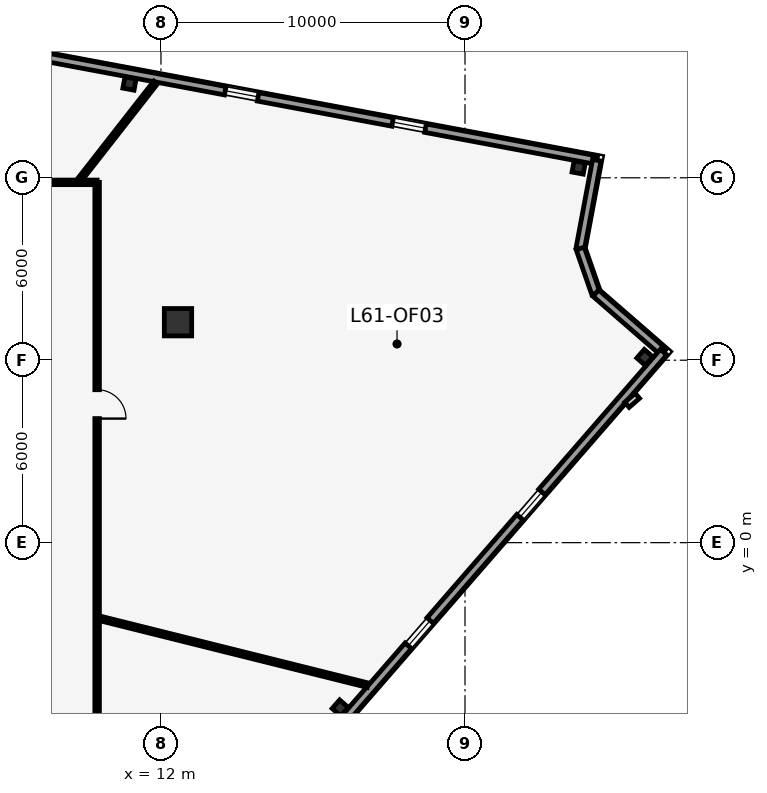
"""IFC4 building model, lengths in metres.
Left out: names, types, materials, properties, quantities, classifications, styles, units other than length and angle.
Written with IfcOpenShell. Run it as: python <this file> out.ifc"""

import sys

from ifc_helpers import new_model, si_unit, direction, frame, frame_2d, origin, origin_2d, place, context, subcontext, project, spatial, rectangle, i_section, extrude, element, fill, save


model = new_model("IFC4")
c1 = context("Model", 3, precision=1e-05, world=origin(), true_north=direction((0.0, 1.0)))
c2 = subcontext(c1, "Body", "Model", "MODEL_VIEW")
j1 = project(units=[si_unit("LENGTHUNIT", "METRE"), si_unit("PLANEANGLEUNIT", "RADIAN")], contexts=[c1])
p1 = place(None, origin())
s1 = spatial("IfcSite", under=j1, at=p1, CompositionType="ELEMENT")
p2 = place(p1, origin())
s2 = spatial("IfcBuilding", under=s1, at=p2, CompositionType="ELEMENT")
p3 = place(p2, frame((0.0, 0.0, 260.9)))
s3 = spatial("IfcBuildingStorey", under=s2, at=p3, CompositionType="ELEMENT", Elevation=260.9)
p4 = place(p3, frame((12.56, 7.25, 0.0), z_axis=(0.0, 0.0, 1.0), x_axis=(1.0, 0.0, 0.0)))
e1 = element("IfcColumn", 1, at=p4, inside=s3, PredefinedType="COLUMN", context=c2, shape_type="SweptSolid", body=[
    extrude(rectangle(XDim=0.9, YDim=0.9, at=origin_2d()), origin(), (0.0, 0.0, 1.0), 4.6),
])
for number, where, z_axis, x_axis in (
    (2, (17.894, -5.436, 0.0), (0.0, 0.0, 1.0), (0.656, 0.755, 0.0)),
    (3, (27.915, 6.091, 0.0), (0.0, 0.0, 1.0), (0.656, 0.755, 0.0)),
    (4, (25.738, 12.338, 0.0), (0.0, 0.0, 1.0), (-0.983, 0.184, 0.0)),
    (5, (10.965, 15.099, 0.0), (0.0, 0.0, 1.0), (-0.983, 0.184, 0.0)),
):
    element("IfcColumn", number, at=place(p3, frame(where, z_axis=z_axis, x_axis=x_axis)), inside=s3, PredefinedType="COLUMN", context=c2, shape_type="SweptSolid", body=[
        extrude(i_section(OverallWidth=0.373, OverallDepth=0.373, WebThickness=0.016, FlangeThickness=0.026, at=origin_2d()), origin(), (0.0, 0.0, 1.0), 4.6),
    ])
p5 = place(p3, frame((-19.042, 21.066, 0.0), z_axis=(0.0, 0.0, 1.0), x_axis=(0.982948140881, -0.183882985453, 0.0)))
e6 = element("IfcWall", 6, at=p5, inside=s3, PredefinedType="STANDARD", context=c2, shape_type="SweptSolid", body=[
    extrude(rectangle(XDim=46.163, YDim=0.28, at=frame_2d((23.081, 0.0))), origin(), (0.0, 0.0, 1.0), 4.35),
])
p6 = place(p5, frame((5.731, 0.0, 0.85)))
e7 = element("IfcOpeningElement", 7, at=p6, cuts=e6, PredefinedType="OPENING", context=c2, shape_type="SweptSolid", body=[
    extrude(rectangle(XDim=1.1, YDim=2.15, at=frame_2d((0.55, 1.075))), frame((0.0, 0.15, 0.0), z_axis=(0.0, -1.0, 0.0), x_axis=(1.0, 0.0, 0.0)), (0.0, 0.0, 1.0), 0.3),
])
p7 = place(p5, frame((33.731, 0.0, 0.85)))
e8 = element("IfcOpeningElement", 8, at=p7, cuts=e6, PredefinedType="OPENING", context=c2, shape_type="SweptSolid", body=[
    extrude(rectangle(XDim=1.1, YDim=2.15, at=frame_2d((0.55, 1.075))), frame((0.0, 0.15, 0.0), z_axis=(0.0, -1.0, 0.0), x_axis=(1.0, 0.0, 0.0)), (0.0, 0.0, 1.0), 0.3),
])
p8 = place(p5, frame((39.331, 0.0, 0.85)))
e9 = element("IfcOpeningElement", 9, at=p8, cuts=e6, PredefinedType="OPENING", context=c2, shape_type="SweptSolid", body=[
    extrude(rectangle(XDim=1.1, YDim=2.15, at=frame_2d((0.55, 1.075))), frame((0.0, 0.15, 0.0), z_axis=(0.0, -1.0, 0.0), x_axis=(1.0, 0.0, 0.0)), (0.0, 0.0, 1.0), 0.3),
])
p9 = place(p3, frame((26.334, 12.578, 0.0), z_axis=(0.0, 0.0, 1.0), x_axis=(-0.183929325972, -0.982939470694, 0.0)))
e10 = element("IfcWall", 10, at=p9, inside=s3, PredefinedType="STANDARD", context=c2, shape_type="SweptSolid", body=[
    extrude(rectangle(XDim=2.955, YDim=0.28, at=frame_2d((1.477, 0.0))), origin(), (0.0, 0.0, 1.0), 4.35),
])
p10 = place(p3, frame((25.791, 9.674, 0.0), z_axis=(0.0, 0.0, 1.0), x_axis=(0.328922695325, -0.944356850189, 0.0)))
e11 = element("IfcWall", 11, at=p10, inside=s3, PredefinedType="STANDARD", context=c2, shape_type="SweptSolid", body=[
    extrude(rectangle(XDim=1.554, YDim=0.28, at=frame_2d((0.777, 0.0))), origin(), (0.0, 0.0, 1.0), 4.35),
])
p11 = place(p3, frame((26.302, 8.206, 0.0), z_axis=(0.0, 0.0, 1.0), x_axis=(0.754717590568, -0.656049814028, 0.0)))
e12 = element("IfcWall", 12, at=p11, inside=s3, PredefinedType="STANDARD", context=c2, shape_type="SweptSolid", body=[
    extrude(rectangle(XDim=2.954, YDim=0.28, at=frame_2d((1.477, 0.0))), origin(), (0.0, 0.0, 1.0), 4.35),
])
p12 = place(p3, frame((28.531, 6.268, 0.0), z_axis=(0.0, 0.0, 1.0), x_axis=(-0.656055748756, -0.754712431674, 0.0)))
e13 = element("IfcWall", 13, at=p12, inside=s3, PredefinedType="STANDARD", context=c2, shape_type="SweptSolid", body=[
    extrude(rectangle(XDim=46.897, YDim=0.28, at=frame_2d((23.448, 0.0))), origin(), (0.0, 0.0, 1.0), 4.35),
])
p13 = place(p12, frame((6.099, 0.0, 0.85)))
e14 = element("IfcOpeningElement", 14, at=p13, cuts=e13, PredefinedType="OPENING", context=c2, shape_type="SweptSolid", body=[
    extrude(rectangle(XDim=1.1, YDim=2.15, at=frame_2d((0.55, 1.075))), frame((0.0, 0.15, 0.0), z_axis=(0.0, -1.0, 0.0), x_axis=(1.0, 0.0, 0.0)), (0.0, 0.0, 1.0), 0.3),
])
p14 = place(p12, frame((11.698, 0.0, 0.85)))
e15 = element("IfcOpeningElement", 15, at=p14, cuts=e13, PredefinedType="OPENING", context=c2, shape_type="SweptSolid", body=[
    extrude(rectangle(XDim=1.1, YDim=2.15, at=frame_2d((0.55, 1.075))), frame((0.0, 0.15, 0.0), z_axis=(0.0, -1.0, 0.0), x_axis=(1.0, 0.0, 0.0)), (0.0, 0.0, 1.0), 0.3),
])
p15 = place(p12, frame((39.698, 0.0, 0.85)))
e16 = element("IfcOpeningElement", 16, at=p15, cuts=e13, PredefinedType="OPENING", context=c2, shape_type="SweptSolid", body=[
    extrude(rectangle(XDim=1.1, YDim=2.15, at=frame_2d((0.55, 1.075))), frame((0.0, 0.15, 0.0), z_axis=(0.0, -1.0, 0.0), x_axis=(1.0, 0.0, 0.0)), (0.0, 0.0, 1.0), 0.3),
])
p16 = place(p3, frame((-2.22, 11.85, 0.0), z_axis=(0.0, 0.0, 1.0), x_axis=(1.0, 0.0, 0.0)))
e17 = element("IfcWall", 17, at=p16, inside=s3, PredefinedType="PARTITIONING", context=c2, shape_type="SweptSolid", body=[
    extrude(rectangle(XDim=12.12, YDim=0.15, at=frame_2d((6.06, 0.0))), origin(), (0.0, 0.0, 1.0), 4.35),
])
p17 = place(p16, frame((5.432, 0.0, 0.0)))
e18 = element("IfcOpeningElement", 18, at=p17, cuts=e17, PredefinedType="OPENING", context=c2, shape_type="SweptSolid", body=[
    extrude(rectangle(XDim=0.95, YDim=2.15, at=frame_2d((0.475, 1.075))), frame((0.0, 0.085, 0.0), z_axis=(0.0, -1.0, 0.0), x_axis=(1.0, 0.0, 0.0)), (0.0, 0.0, 1.0), 0.17),
])
p18 = place(p3, frame((9.9, 11.85, 0.0), z_axis=(0.0, 0.0, 1.0), x_axis=(0.0, -1.0, 0.0)))
e19 = element("IfcWall", 19, at=p18, inside=s3, PredefinedType="PARTITIONING", context=c2, shape_type="SweptSolid", body=[
    extrude(rectangle(XDim=22.634, YDim=0.15, at=frame_2d((11.317, 0.0))), origin(), (0.0, 0.0, 1.0), 4.35),
])
p19 = place(p18, frame((17.885, 0.0, 0.0)))
e20 = element("IfcOpeningElement", 20, at=p19, cuts=e19, PredefinedType="OPENING", context=c2, shape_type="SweptSolid", body=[
    extrude(rectangle(XDim=0.95, YDim=2.15, at=frame_2d((0.475, 1.075))), frame((0.0, 0.085, 0.0), z_axis=(0.0, -1.0, 0.0), x_axis=(1.0, 0.0, 0.0)), (0.0, 0.0, 1.0), 0.17),
])
p20 = place(p18, frame((6.82, 0.0, 0.0)))
e21 = element("IfcOpeningElement", 21, at=p20, cuts=e19, PredefinedType="OPENING", context=c2, shape_type="SweptSolid", body=[
    extrude(rectangle(XDim=0.95, YDim=2.15, at=frame_2d((0.475, 1.075))), frame((0.0, 0.085, 0.0), z_axis=(0.0, -1.0, 0.0), x_axis=(1.0, 0.0, 0.0)), (0.0, 0.0, 1.0), 0.17),
])
p21 = place(p3, frame((9.34, 11.955, 0.0), z_axis=(0.0, 0.0, 1.0), x_axis=(0.615673396763, 0.788001439414, 0.0)))
e22 = element("IfcWall", 22, at=p21, inside=s3, PredefinedType="PARTITIONING", context=c2, shape_type="SweptSolid", body=[
    extrude(rectangle(XDim=4.035, YDim=0.15, at=frame_2d((2.018, 0.0))), origin(), (0.0, 0.0, 1.0), 4.35),
])
p22 = place(p3, frame((10.005, -2.494, 0.0), z_axis=(0.0, 0.0, 1.0), x_axis=(0.970294360483, -0.24192737343, 0.0)))
e23 = element("IfcWall", 23, at=p22, inside=s3, PredefinedType="PARTITIONING", context=c2, shape_type="SweptSolid", body=[
    extrude(rectangle(XDim=9.067, YDim=0.15, at=frame_2d((4.534, 0.0))), origin(), (0.0, 0.0, 1.0), 4.35),
])
p23 = place(p7, origin())
e24 = element("IfcWindow", 24, at=p23, inside=s3, PartitioningType="SINGLE_PANEL", PredefinedType="WINDOW", context=c2, shape_type="SweptSolid", body=[
    extrude(rectangle(XDim=1.1, YDim=2.15, at=frame_2d((0.55, 1.075))), frame((0.0, 0.03, 0.0), z_axis=(0.0, -1.0, 0.0), x_axis=(1.0, 0.0, 0.0)), (0.0, 0.0, 1.0), 0.06),
])
fill(e8, e24)
p24 = place(p8, origin())
e25 = element("IfcWindow", 25, at=p24, inside=s3, PartitioningType="SINGLE_PANEL", PredefinedType="WINDOW", context=c2, shape_type="SweptSolid", body=[
    extrude(rectangle(XDim=1.1, YDim=2.15, at=frame_2d((0.55, 1.075))), frame((0.0, 0.03, 0.0), z_axis=(0.0, -1.0, 0.0), x_axis=(1.0, 0.0, 0.0)), (0.0, 0.0, 1.0), 0.06),
])
fill(e9, e25)
p25 = place(p13, origin())
e26 = element("IfcWindow", 26, at=p25, inside=s3, PartitioningType="SINGLE_PANEL", PredefinedType="WINDOW", context=c2, shape_type="SweptSolid", body=[
    extrude(rectangle(XDim=1.1, YDim=2.15, at=frame_2d((0.55, 1.075))), frame((0.0, 0.03, 0.0), z_axis=(0.0, -1.0, 0.0), x_axis=(1.0, 0.0, 0.0)), (0.0, 0.0, 1.0), 0.06),
])
fill(e14, e26)
p26 = place(p14, origin())
e27 = element("IfcWindow", 27, at=p26, inside=s3, PartitioningType="SINGLE_PANEL", PredefinedType="WINDOW", context=c2, shape_type="SweptSolid", body=[
    extrude(rectangle(XDim=1.1, YDim=2.15, at=frame_2d((0.55, 1.075))), frame((0.0, 0.03, 0.0), z_axis=(0.0, -1.0, 0.0), x_axis=(1.0, 0.0, 0.0)), (0.0, 0.0, 1.0), 0.06),
])
fill(e15, e27)
p27 = place(p20, origin())
e28 = element("IfcDoor", 28, at=p27, inside=s3, OperationType="SINGLE_SWING_RIGHT", PredefinedType="DOOR", context=c2, shape_type="SweptSolid", body=[
    extrude(rectangle(XDim=0.95, YDim=2.15, at=frame_2d((0.475, 1.075))), frame((0.0, 0.025, 0.0), z_axis=(0.0, -1.0, 0.0), x_axis=(1.0, 0.0, 0.0)), (0.0, 0.0, 1.0), 0.05),
])
fill(e21, e28)
save(model, sys.argv[1])
